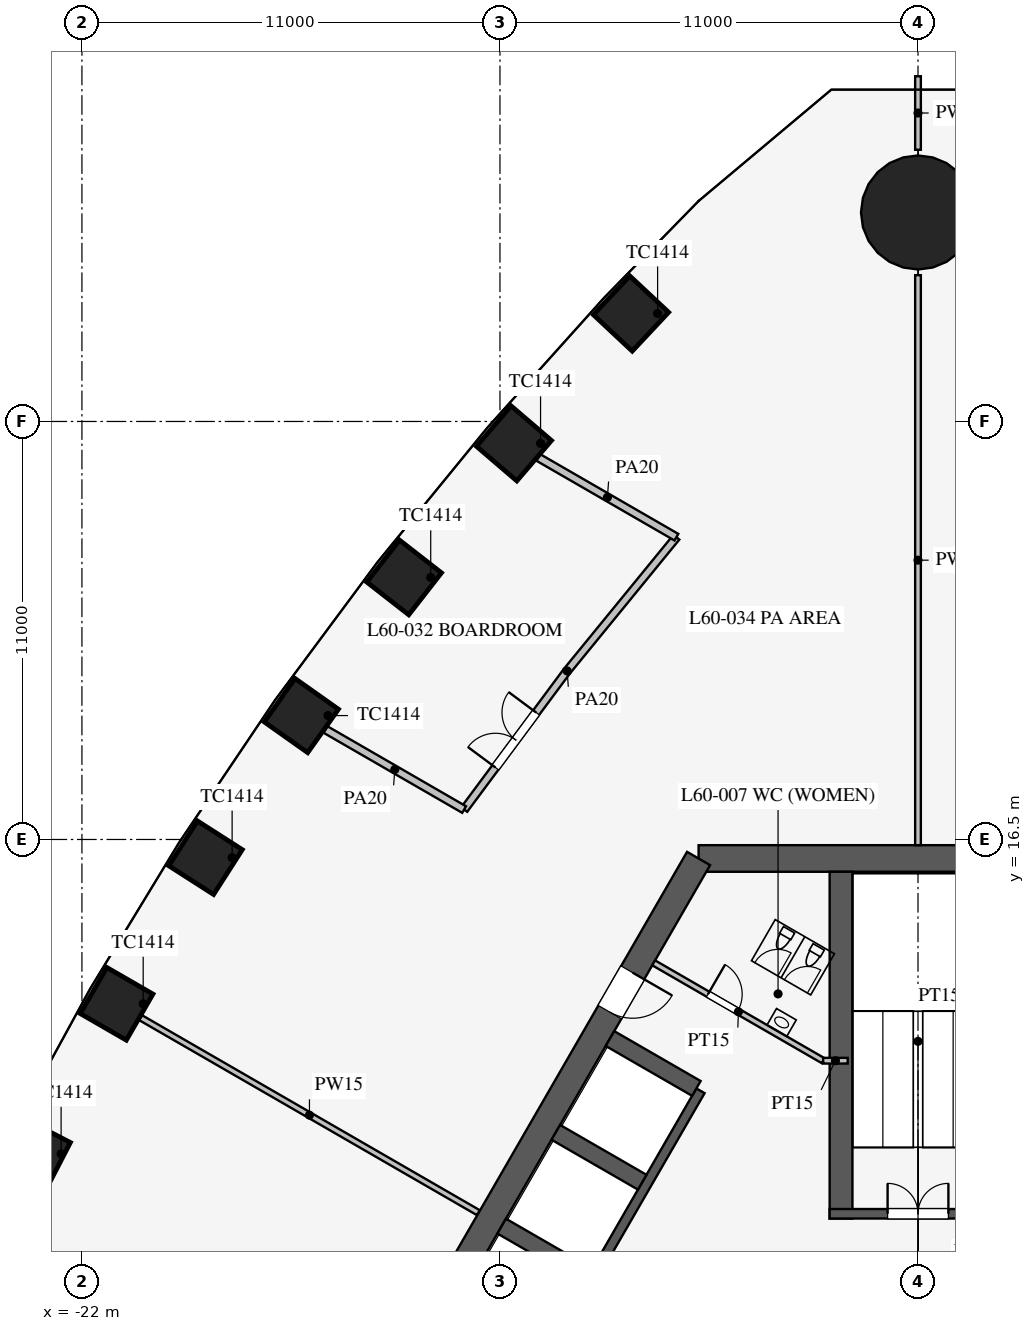
"""IFC4 building model, lengths in metres.
Left out: names, types, materials, properties, quantities, classifications, styles, units other than length and angle.
Written with IfcOpenShell. Run it as: python <this file> out.ifc"""

import sys

from ifc_helpers import new_model, si_unit, direction, frame, frame_2d, origin, origin_2d, place, context, subcontext, project, spatial, rectangle, circle, extrude, element, fill, save


model = new_model("IFC4")
c1 = context("Model", 3, precision=1e-05, world=origin(), true_north=direction((0.0, 1.0)))
c2 = subcontext(c1, "Body", "Model", "MODEL_VIEW")
j1 = project(units=[si_unit("LENGTHUNIT", "METRE"), si_unit("PLANEANGLEUNIT", "RADIAN")], contexts=[c1])
p1 = place(None, origin())
s1 = spatial("IfcSite", under=j1, at=p1, CompositionType="ELEMENT")
p2 = place(p1, origin())
s2 = spatial("IfcBuilding", under=s1, at=p2, CompositionType="ELEMENT")
p3 = place(p2, frame((0.0, 0.0, 261.1)))
s3 = spatial("IfcBuildingStorey", under=s2, at=p3, CompositionType="ELEMENT", Elevation=261.1)
for number, where, z_axis, x_axis in (
    (1, (-7.552, 30.341, 0.0), (0.0, 0.0, 1.0), (-0.684, -0.73, 0.0)),
    (2, (-10.632, 26.923, 0.0), (0.0, 0.0, 1.0), (-0.651, -0.759, 0.0)),
    (3, (-13.522, 23.396, 0.0), (0.0, 0.0, 1.0), (-0.615, -0.789, 0.0)),
    (4, (-16.227, 19.761, 0.0), (0.0, 0.0, 1.0), (-0.577, -0.816, 0.0)),
    (5, (-18.748, 16.02, 0.0), (0.0, 0.0, 1.0), (-0.539, -0.842, 0.0)),
    (6, (-21.088, 12.175, 0.0), (0.0, 0.0, 1.0), (-0.5, -0.866, 0.0)),
    (7, (-23.248, 8.226, 0.0), (0.0, 0.0, 1.0), (-0.46, -0.888, 0.0)),
):
    element("IfcColumn", number, at=place(p3, frame(where, z_axis=z_axis, x_axis=x_axis)), inside=s3, PredefinedType="COLUMN", context=c2, shape_type="SweptSolid", body=[
        extrude(rectangle(XDim=1.4, YDim=1.4, at=origin_2d()), origin(), (0.0, 0.0, 1.0), 4.2),
    ])
p4 = place(p3, frame((0.0, 33.0, 0.0), z_axis=(0.0, 0.0, 1.0), x_axis=(1.0, 0.0, 0.0)))
e8 = element("IfcColumn", 8, at=p4, inside=s3, PredefinedType="COLUMN", context=c2, shape_type="SweptSolid", body=[
    extrude(circle(Radius=1.5, at=origin_2d()), origin(), (0.0, 0.0, 1.0), 4.2),
])
p5 = place(p3, frame((5.773, 16.0, 0.0), z_axis=(0.0, 0.0, 1.0), x_axis=(-1.0, 0.0, 0.0)))
e9 = element("IfcWall", 9, at=p5, inside=s3, PredefinedType="SHEAR", context=c2, shape_type="SweptSolid", body=[
    extrude(rectangle(XDim=11.547, YDim=0.7, at=frame_2d((5.773, 0.0))), origin(), (0.0, 0.0, 1.0), 4.2),
])
p6 = place(p3, frame((-5.773, 16.0, 0.0), z_axis=(0.0, 0.0, 1.0), x_axis=(-0.500002442456, -0.866023993627, 0.0)))
e10 = element("IfcWall", 10, at=p6, inside=s3, PredefinedType="SHEAR", context=c2, shape_type="SweptSolid", body=[
    extrude(rectangle(XDim=21.939, YDim=0.7, at=frame_2d((10.97, 0.0))), origin(), (0.0, 0.0, 1.0), 4.2),
])
p7 = place(p6, frame((17.27, 0.0, 0.0)))
e11 = element("IfcOpeningElement", 11, at=p7, cuts=e10, PredefinedType="OPENING", context=c2, shape_type="SweptSolid", body=[
    extrude(rectangle(XDim=1.2, YDim=2.1, at=frame_2d((0.6, 1.05))), frame((0.0, 0.36, 0.0), z_axis=(0.0, -1.0, 0.0), x_axis=(1.0, 0.0, 0.0)), (0.0, 0.0, 1.0), 0.72),
])
p8 = place(p6, frame((3.47, 0.0, 0.0)))
e12 = element("IfcOpeningElement", 12, at=p8, cuts=e10, PredefinedType="OPENING", context=c2, shape_type="SweptSolid", body=[
    extrude(rectangle(XDim=1.2, YDim=2.1, at=frame_2d((0.6, 1.05))), frame((0.0, 0.36, 0.0), z_axis=(0.0, -1.0, 0.0), x_axis=(1.0, 0.0, 0.0)), (0.0, 0.0, 1.0), 0.72),
])
p9 = place(p3, frame((-5.724, 9.886, 0.0), z_axis=(0.0, 0.0, 1.0), x_axis=(-0.500001763848, -0.866024385424, 0.0)))
e13 = element("IfcWall", 13, at=p9, inside=s3, PredefinedType="SHEAR", context=c2, shape_type="SweptSolid", body=[
    extrude(rectangle(XDim=11.4, YDim=0.25, at=frame_2d((5.7, 0.0))), origin(), (0.0, 0.0, 1.0), 4.2),
])
p10 = place(p9, frame((6.525, 0.0, 0.0)))
e14 = element("IfcOpeningElement", 14, at=p10, cuts=e13, PredefinedType="OPENING", context=c2, shape_type="SweptSolid", body=[
    extrude(rectangle(XDim=1.2, YDim=2.2, at=frame_2d((0.6, 1.1))), frame((0.0, 0.135, 0.0), z_axis=(0.0, -1.0, 0.0), x_axis=(1.0, 0.0, 0.0)), (0.0, 0.0, 1.0), 0.27),
])
p11 = place(p9, frame((9.375, 0.0, 0.0)))
e15 = element("IfcOpeningElement", 15, at=p11, cuts=e13, PredefinedType="OPENING", context=c2, shape_type="SweptSolid", body=[
    extrude(rectangle(XDim=1.2, YDim=2.2, at=frame_2d((0.6, 1.1))), frame((0.0, 0.135, 0.0), z_axis=(0.0, -1.0, 0.0), x_axis=(1.0, 0.0, 0.0)), (0.0, 0.0, 1.0), 0.27),
])
for number, where, z_axis, x_axis in (
    (16, (-5.832, 9.949, 0.0), (0.0, 0.0, 1.0), (-0.866, 0.5, 0.0)),
    (17, (-7.257, 7.481, 0.0), (0.0, 0.0, 1.0), (-0.866, 0.5, 0.0)),
    (18, (-8.682, 5.012, 0.0), (0.0, 0.0, 1.0), (-0.866, 0.5, 0.0)),
):
    element("IfcWall", number, at=place(p3, frame(where, z_axis=z_axis, x_axis=x_axis)), inside=s3, PredefinedType="SHEAR", context=c2, shape_type="SweptSolid", body=[
        extrude(rectangle(XDim=2.625, YDim=0.45, at=frame_2d((1.312, 0.0))), origin(), (0.0, 0.0, 1.0), 4.2),
    ])
p12 = place(p3, frame((-2.025, 6.525, 0.0), z_axis=(0.0, 0.0, 1.0), x_axis=(0.0, 1.0, 0.0)))
e19 = element("IfcWall", 19, at=p12, inside=s3, PredefinedType="SHEAR", context=c2, shape_type="SweptSolid", body=[
    extrude(rectangle(XDim=9.125, YDim=0.6, at=frame_2d((4.562, 0.0))), origin(), (0.0, 0.0, 1.0), 4.2),
])
p13 = place(p3, frame((2.325, 6.65, 0.0), z_axis=(0.0, 0.0, 1.0), x_axis=(-1.0, 0.0, 0.0)))
e20 = element("IfcWall", 20, at=p13, inside=s3, PredefinedType="SHEAR", context=c2, shape_type="SweptSolid", body=[
    extrude(rectangle(XDim=4.65, YDim=0.25, at=frame_2d((2.325, 0.0))), origin(), (0.0, 0.0, 1.0), 4.2),
])
p14 = place(p13, frame((1.525, 0.0, 0.0)))
e21 = element("IfcOpeningElement", 21, at=p14, cuts=e20, PredefinedType="OPENING", context=c2, shape_type="SweptSolid", body=[
    extrude(rectangle(XDim=1.6, YDim=2.1, at=frame_2d((0.8, 1.05))), frame((0.0, 0.135, 0.0), z_axis=(0.0, -1.0, 0.0), x_axis=(1.0, 0.0, 0.0)), (0.0, 0.0, 1.0), 0.27),
])
p15 = place(p3, frame((-2.495, 10.678, 0.0), z_axis=(0.0, 0.0, 1.0), x_axis=(-0.866037967349, 0.499978238636, 0.0)))
e22 = element("IfcWall", 22, at=p15, inside=s3, PredefinedType="PARTITIONING", context=c2, shape_type="SweptSolid", body=[
    extrude(rectangle(XDim=5.15, YDim=0.15, at=frame_2d((2.575, 0.0))), origin(), (0.0, 0.0, 1.0), 3.95),
])
p16 = place(p15, frame((2.6, 0.0, 0.0)))
e23 = element("IfcOpeningElement", 23, at=p16, cuts=e22, PredefinedType="OPENING", context=c2, shape_type="SweptSolid", body=[
    extrude(rectangle(XDim=0.9, YDim=2.1, at=frame_2d((0.45, 1.05))), frame((0.0, 0.085, 0.0), z_axis=(0.0, -1.0, 0.0), x_axis=(1.0, 0.0, 0.0)), (0.0, 0.0, 1.0), 0.17),
])
p17 = place(p3, frame((-2.495, 10.678, 0.0), z_axis=(0.0, 0.0, 1.0), x_axis=(1.0, 0.0, 0.0)))
e24 = element("IfcWall", 24, at=p17, inside=s3, PredefinedType="PARTITIONING", context=c2, shape_type="SweptSolid", body=[
    extrude(rectangle(XDim=0.645, YDim=0.15, at=frame_2d((0.323, 0.0))), origin(), (0.0, 0.0, 1.0), 3.95),
])
p18 = place(p3, frame((0.0, 16.35, 0.0), z_axis=(0.0, 0.0, 1.0), x_axis=(0.0, 1.0, 0.0)))
e25 = element("IfcWall", 25, at=p18, inside=s3, PredefinedType="PARTITIONING", context=c2, shape_type="SweptSolid", body=[
    extrude(rectangle(XDim=15.0, YDim=0.15, at=frame_2d((7.5, 0.0))), origin(), (0.0, 0.0, 1.0), 1.95),
])
p19 = place(p3, frame((0.0, 34.65, 0.0), z_axis=(0.0, 0.0, 1.0), x_axis=(0.0, 1.0, 0.0)))
e26 = element("IfcWall", 26, at=p19, inside=s3, PredefinedType="PARTITIONING", context=c2, shape_type="SweptSolid", body=[
    extrude(rectangle(XDim=1.935, YDim=0.15, at=frame_2d((0.967, 0.0))), origin(), (0.0, 0.0, 1.0), 1.95),
])
p20 = place(p3, frame((-11.57, 6.68, 0.0), z_axis=(0.0, 0.0, 1.0), x_axis=(-0.866023526028, 0.500003252355, 0.0)))
e27 = element("IfcWall", 27, at=p20, inside=s3, PredefinedType="PARTITIONING", context=c2, shape_type="SweptSolid", body=[
    extrude(rectangle(XDim=10.261, YDim=0.15, at=frame_2d((5.13, 0.0))), origin(), (0.0, 0.0, 1.0), 2.35),
])
p21 = place(p3, frame((-9.242, 20.924, 0.0), z_axis=(0.0, 0.0, 1.0), x_axis=(-0.59613842716, -0.802881669777, 0.0)))
e28 = element("IfcWall", 28, at=p21, inside=s3, PredefinedType="PARTITIONING", context=c2, shape_type="SweptSolid", body=[
    extrude(rectangle(XDim=4.53, YDim=0.2, at=frame_2d((2.265, 0.0))), origin(), (0.0, 0.0, 1.0), 2.9),
])
p22 = place(p21, frame((1.35, 0.0, 0.15)))
e29 = element("IfcOpeningElement", 29, at=p22, cuts=e28, PredefinedType="OPENING", context=c2, shape_type="SweptSolid", body=[
    extrude(rectangle(XDim=1.8, YDim=2.1, at=frame_2d((0.9, 1.05))), frame((0.0, 0.11, 0.0), z_axis=(0.0, -1.0, 0.0), x_axis=(1.0, 0.0, 0.0)), (0.0, 0.0, 1.0), 0.22),
])
p23 = place(p3, frame((-6.357, 24.455, 0.0), z_axis=(0.0, 0.0, 1.0), x_axis=(-0.632765292047, -0.774343647989, 0.0)))
e30 = element("IfcWall", 30, at=p23, inside=s3, PredefinedType="PARTITIONING", context=c2, shape_type="SweptSolid", body=[
    extrude(rectangle(XDim=4.559, YDim=0.2, at=frame_2d((2.28, 0.0))), origin(), (0.0, 0.0, 1.0), 2.9),
])
p24 = place(p3, frame((-6.357, 24.455, 0.0), z_axis=(0.0, 0.0, 1.0), x_axis=(-0.866016898545, 0.500014731218, 0.0)))
e31 = element("IfcWall", 31, at=p24, inside=s3, PredefinedType="PARTITIONING", context=c2, shape_type="SweptSolid", body=[
    extrude(rectangle(XDim=4.194, YDim=0.2, at=frame_2d((2.097, 0.0))), origin(), (0.0, 0.0, 1.0), 2.15),
])
p25 = place(p3, frame((-11.943, 17.287, 0.0), z_axis=(0.0, 0.0, 1.0), x_axis=(-0.866016734951, 0.50001501456, 0.0)))
e32 = element("IfcWall", 32, at=p25, inside=s3, PredefinedType="PARTITIONING", context=c2, shape_type="SweptSolid", body=[
    extrude(rectangle(XDim=4.214, YDim=0.2, at=frame_2d((2.107, 0.0))), origin(), (0.0, 0.0, 1.0), 2.35),
])
p26 = place(p16, frame((0.9, 0.0, 0.0), z_axis=(0.0, 0.0, 1.0), x_axis=(-1.0, 0.0, 0.0)))
e33 = element("IfcDoor", 33, at=p26, inside=s3, OperationType="SINGLE_SWING_LEFT", PredefinedType="DOOR", context=c2, shape_type="SweptSolid", body=[
    extrude(rectangle(XDim=0.9, YDim=2.1, at=frame_2d((0.45, 1.05))), frame((0.0, 0.025, 0.0), z_axis=(0.0, -1.0, 0.0), x_axis=(1.0, 0.0, 0.0)), (0.0, 0.0, 1.0), 0.05),
])
fill(e23, e33)
p27 = place(p14, frame((1.6, 0.0, 0.0), z_axis=(0.0, 0.0, 1.0), x_axis=(-1.0, 0.0, 0.0)))
e34 = element("IfcDoor", 34, at=p27, inside=s3, OperationType="DOUBLE_DOOR_SINGLE_SWING", PredefinedType="DOOR", context=c2, shape_type="SweptSolid", body=[
    extrude(rectangle(XDim=1.6, YDim=2.1, at=frame_2d((0.8, 1.05))), frame((0.0, 0.025, 0.0), z_axis=(0.0, -1.0, 0.0), x_axis=(1.0, 0.0, 0.0)), (0.0, 0.0, 1.0), 0.05),
])
fill(e21, e34)
p28 = place(p8, origin())
e35 = element("IfcDoor", 35, at=p28, inside=s3, OperationType="SINGLE_SWING_LEFT", PredefinedType="DOOR", context=c2, shape_type="SweptSolid", body=[
    extrude(rectangle(XDim=1.2, YDim=2.1, at=frame_2d((0.6, 1.05))), frame((0.0, 0.025, 0.0), z_axis=(0.0, -1.0, 0.0), x_axis=(1.0, 0.0, 0.0)), (0.0, 0.0, 1.0), 0.05),
])
fill(e12, e35)
p29 = place(p22, frame((1.8, 0.0, 0.0), z_axis=(0.0, 0.0, 1.0), x_axis=(-1.0, 0.0, 0.0)))
e36 = element("IfcDoor", 36, at=p29, inside=s3, OperationType="DOUBLE_DOOR_SINGLE_SWING", PredefinedType="DOOR", context=c2, shape_type="SweptSolid", body=[
    extrude(rectangle(XDim=1.8, YDim=2.1, at=frame_2d((0.9, 1.05))), frame((0.0, 0.025, 0.0), z_axis=(0.0, -1.0, 0.0), x_axis=(1.0, 0.0, 0.0)), (0.0, 0.0, 1.0), 0.05),
])
fill(e29, e36)
save(model, sys.argv[1])
